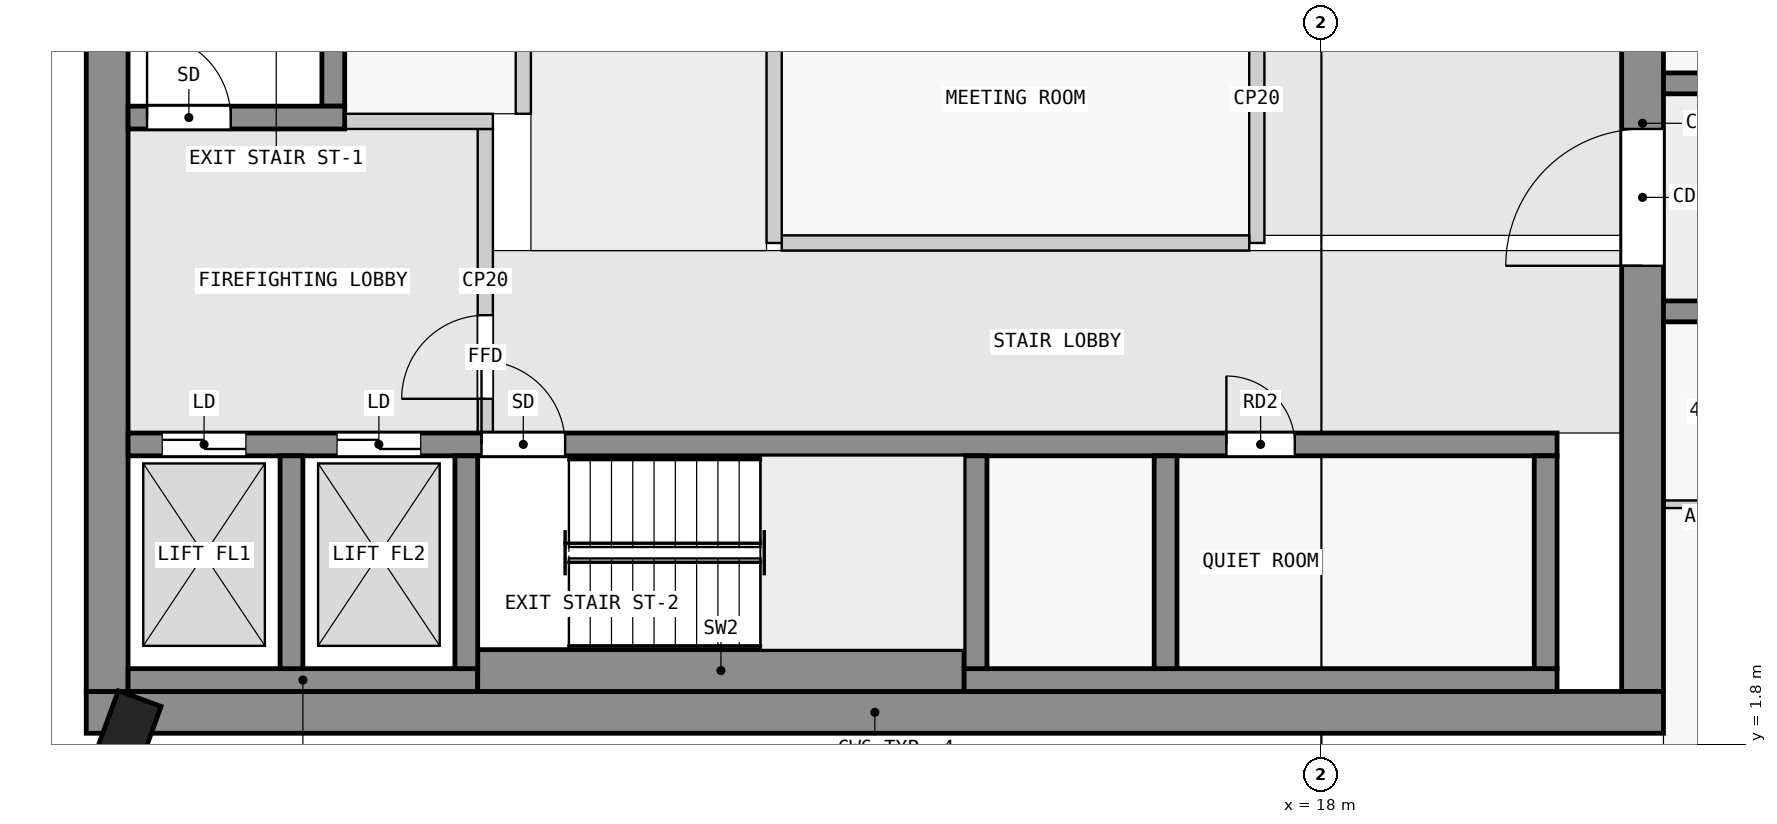
"""IFC4 building model, lengths in metres.
Left out: names, types, materials, properties, quantities, classifications, styles, units other than length and angle.
Written with IfcOpenShell. Run it as: python <this file> out.ifc"""

import sys

from ifc_helpers import new_model, si_unit, direction, frame, frame_2d, origin, origin_2d, place, context, subcontext, project, spatial, rectangle, extrude, element, fill, save


model = new_model("IFC4")
c1 = context("Model", 3, precision=1e-05, world=origin(), true_north=direction((0.0, 1.0)))
c2 = subcontext(c1, "Body", "Model", "MODEL_VIEW")
j1 = project(units=[si_unit("LENGTHUNIT", "METRE"), si_unit("PLANEANGLEUNIT", "RADIAN")], contexts=[c1])
p1 = place(None, origin())
s1 = spatial("IfcSite", under=j1, at=p1, CompositionType="ELEMENT")
p2 = place(p1, origin())
s2 = spatial("IfcBuilding", under=s1, at=p2, CompositionType="ELEMENT")
p3 = place(p2, frame((0.0, 0.0, 190.9)))
s3 = spatial("IfcBuildingStorey", under=s2, at=p3, CompositionType="ELEMENT", Elevation=190.9)
p4 = place(p3, frame((2.213, 1.748, 0.0), z_axis=(0.0, 0.0, 1.0), x_axis=(-0.939664280925, 0.342097996418, 0.0)))
e1 = element("IfcColumn", 1, at=p4, inside=s3, PredefinedType="COLUMN", context=c2, shape_type="SweptSolid", body=[
    extrude(rectangle(XDim=0.6, YDim=1.4, at=origin_2d()), origin(), (0.0, 0.0, 1.0), 3.5),
])
p5 = place(p3, frame((1.75, 2.225, 0.0), z_axis=(0.0, 0.0, 1.0), x_axis=(1.0, 0.0, 0.0)))
e2 = element("IfcWall", 2, at=p5, inside=s3, PredefinedType="SHEAR", context=c2, shape_type="SweptSolid", body=[
    extrude(rectangle(XDim=20.75, YDim=0.55, at=frame_2d((10.375, 0.0))), origin(), (0.0, 0.0, 1.0), 3.25),
])
p6 = place(p3, frame((2.025, 2.5, 0.0), z_axis=(0.0, 0.0, 1.0), x_axis=(0.0, 1.0, 0.0)))
e3 = element("IfcWall", 3, at=p6, inside=s3, PredefinedType="SHEAR", context=c2, shape_type="SweptSolid", body=[
    extrude(rectangle(XDim=14.95, YDim=0.55, at=frame_2d((7.475, 0.0))), origin(), (0.0, 0.0, 1.0), 3.25),
])
p7 = place(p3, frame((22.225, 2.5, 0.0), z_axis=(0.0, 0.0, 1.0), x_axis=(0.0, 1.0, 0.0)))
e4 = element("IfcWall", 4, at=p7, inside=s3, PredefinedType="SHEAR", context=c2, shape_type="SweptSolid", body=[
    extrude(rectangle(XDim=14.95, YDim=0.55, at=frame_2d((7.475, 0.0))), origin(), (0.0, 0.0, 1.0), 3.25),
])
p8 = place(p7, frame((5.6, 0.0, 0.0)))
e5 = element("IfcOpeningElement", 5, at=p8, cuts=e4, PredefinedType="OPENING", context=c2, shape_type="SweptSolid", body=[
    extrude(rectangle(XDim=1.8, YDim=2.1, at=frame_2d((0.9, 1.05))), frame((0.0, 0.285, 0.0), z_axis=(0.0, -1.0, 0.0), x_axis=(1.0, 0.0, 0.0)), (0.0, 0.0, 1.0), 0.57),
])
p9 = place(p3, frame((2.3, 2.65, 0.0), z_axis=(0.0, 0.0, 1.0), x_axis=(1.0, 0.0, 0.0)))
e6 = element("IfcWall", 6, at=p9, inside=s3, PredefinedType="SHEAR", context=c2, shape_type="SweptSolid", body=[
    extrude(rectangle(XDim=4.6, YDim=0.3, at=frame_2d((2.3, 0.0))), origin(), (0.0, 0.0, 1.0), 3.25),
])
p10 = place(p3, frame((6.9, 2.775, 0.0), z_axis=(0.0, 0.0, 1.0), x_axis=(1.0, 0.0, 0.0)))
e7 = element("IfcWall", 7, at=p10, inside=s3, PredefinedType="SHEAR", context=c2, shape_type="SweptSolid", body=[
    extrude(rectangle(XDim=6.4, YDim=0.55, at=frame_2d((3.2, 0.0))), origin(), (0.0, 0.0, 1.0), 3.25),
])
p11 = place(p3, frame((13.3, 2.65, 0.0), z_axis=(0.0, 0.0, 1.0), x_axis=(1.0, 0.0, 0.0)))
e8 = element("IfcWall", 8, at=p11, inside=s3, PredefinedType="SHEAR", context=c2, shape_type="SweptSolid", body=[
    extrude(rectangle(XDim=7.8, YDim=0.3, at=frame_2d((3.9, 0.0))), origin(), (0.0, 0.0, 1.0), 3.25),
])
for number, where, z_axis, x_axis in (
    (9, (4.45, 2.8, 0.0), (0.0, 0.0, 1.0), (0.0, 1.0, 0.0)),
    (10, (6.75, 2.8, 0.0), (0.0, 0.0, 1.0), (0.0, 1.0, 0.0)),
    (11, (13.45, 2.8, 0.0), (0.0, 0.0, 1.0), (0.0, 1.0, 0.0)),
    (12, (20.95, 2.8, 0.0), (0.0, 0.0, 1.0), (0.0, 1.0, 0.0)),
):
    element("IfcWall", number, at=place(p3, frame(where, z_axis=z_axis, x_axis=x_axis)), inside=s3, PredefinedType="SHEAR", context=c2, shape_type="SweptSolid", body=[
        extrude(rectangle(XDim=2.8, YDim=0.3, at=frame_2d((1.4, 0.0))), origin(), (0.0, 0.0, 1.0), 3.25),
    ])
p12 = place(p3, frame((2.3, 5.75, 0.0), z_axis=(0.0, 0.0, 1.0), x_axis=(1.0, 0.0, 0.0)))
e13 = element("IfcWall", 13, at=p12, inside=s3, PredefinedType="SHEAR", context=c2, shape_type="SweptSolid", body=[
    extrude(rectangle(XDim=18.8, YDim=0.3, at=frame_2d((9.4, 0.0))), origin(), (0.0, 0.0, 1.0), 3.25),
])
p13 = place(p12, frame((4.65, 0.0, 0.0)))
e14 = element("IfcOpeningElement", 14, at=p13, cuts=e13, PredefinedType="OPENING", context=c2, shape_type="SweptSolid", body=[
    extrude(rectangle(XDim=1.1, YDim=2.1, at=frame_2d((0.55, 1.05))), frame((0.0, 0.16, 0.0), z_axis=(0.0, -1.0, 0.0), x_axis=(1.0, 0.0, 0.0)), (0.0, 0.0, 1.0), 0.32),
])
p14 = place(p12, frame((0.45, 0.0, 0.0)))
e15 = element("IfcOpeningElement", 15, at=p14, cuts=e13, PredefinedType="OPENING", context=c2, shape_type="SweptSolid", body=[
    extrude(rectangle(XDim=1.1, YDim=2.1, at=frame_2d((0.55, 1.05))), frame((0.0, 0.16, 0.0), z_axis=(0.0, -1.0, 0.0), x_axis=(1.0, 0.0, 0.0)), (0.0, 0.0, 1.0), 0.32),
])
p15 = place(p12, frame((2.75, 0.0, 0.0)))
e16 = element("IfcOpeningElement", 16, at=p15, cuts=e13, PredefinedType="OPENING", context=c2, shape_type="SweptSolid", body=[
    extrude(rectangle(XDim=1.1, YDim=2.1, at=frame_2d((0.55, 1.05))), frame((0.0, 0.16, 0.0), z_axis=(0.0, -1.0, 0.0), x_axis=(1.0, 0.0, 0.0)), (0.0, 0.0, 1.0), 0.32),
])
p16 = place(p12, frame((14.45, 0.0, 0.0)))
e17 = element("IfcOpeningElement", 17, at=p16, cuts=e13, PredefinedType="OPENING", context=c2, shape_type="SweptSolid", body=[
    extrude(rectangle(XDim=0.9, YDim=2.1, at=frame_2d((0.45, 1.05))), frame((0.0, 0.16, 0.0), z_axis=(0.0, -1.0, 0.0), x_axis=(1.0, 0.0, 0.0)), (0.0, 0.0, 1.0), 0.32),
])
p17 = place(p3, frame((2.3, 10.05, 0.0), z_axis=(0.0, 0.0, 1.0), x_axis=(1.0, 0.0, 0.0)))
e18 = element("IfcWall", 18, at=p17, inside=s3, PredefinedType="SHEAR", context=c2, shape_type="SweptSolid", body=[
    extrude(rectangle(XDim=2.85, YDim=0.3, at=frame_2d((1.425, 0.0))), origin(), (0.0, 0.0, 1.0), 3.25),
])
p18 = place(p17, frame((0.25, 0.0, 0.0)))
e19 = element("IfcOpeningElement", 19, at=p18, cuts=e18, PredefinedType="OPENING", context=c2, shape_type="SweptSolid", body=[
    extrude(rectangle(XDim=1.1, YDim=2.1, at=frame_2d((0.55, 1.05))), frame((0.0, 0.16, 0.0), z_axis=(0.0, -1.0, 0.0), x_axis=(1.0, 0.0, 0.0)), (0.0, 0.0, 1.0), 0.32),
])
p19 = place(p3, frame((5.0, 10.2, 0.0), z_axis=(0.0, 0.0, 1.0), x_axis=(0.0, 1.0, 0.0)))
e20 = element("IfcWall", 20, at=p19, inside=s3, PredefinedType="SHEAR", context=c2, shape_type="SweptSolid", body=[
    extrude(rectangle(XDim=6.4, YDim=0.3, at=frame_2d((3.2, 0.0))), origin(), (0.0, 0.0, 1.0), 3.25),
])
p20 = place(p3, frame((22.5, 7.5, 0.0), z_axis=(0.0, 0.0, 1.0), x_axis=(1.0, 0.0, 0.0)))
e21 = element("IfcWall", 21, at=p20, inside=s3, PredefinedType="SHEAR", context=c2, shape_type="SweptSolid", body=[
    extrude(rectangle(XDim=22.5, YDim=0.275, at=frame_2d((11.25, 0.0))), origin(), (0.0, 0.0, 1.0), 3.25),
])
p21 = place(p20, frame((1.75, 0.0, 0.0)))
e22 = element("IfcOpeningElement", 22, at=p21, cuts=e21, PredefinedType="OPENING", context=c2, shape_type="SweptSolid", body=[
    extrude(rectangle(XDim=1.0, YDim=2.1, at=frame_2d((0.5, 1.05))), frame((0.0, 0.147, 0.0), z_axis=(0.0, -1.0, 0.0), x_axis=(1.0, 0.0, 0.0)), (0.0, 0.0, 1.0), 0.295),
])
p22 = place(p20, frame((5.85, 0.0, 0.0)))
e23 = element("IfcOpeningElement", 23, at=p22, cuts=e21, PredefinedType="OPENING", context=c2, shape_type="SweptSolid", body=[
    extrude(rectangle(XDim=1.8, YDim=2.1, at=frame_2d((0.9, 1.05))), frame((0.0, 0.147, 0.0), z_axis=(0.0, -1.0, 0.0), x_axis=(1.0, 0.0, 0.0)), (0.0, 0.0, 1.0), 0.295),
])
p23 = place(p20, frame((10.75, 0.0, 0.0)))
e24 = element("IfcOpeningElement", 24, at=p23, cuts=e21, PredefinedType="OPENING", context=c2, shape_type="SweptSolid", body=[
    extrude(rectangle(XDim=1.0, YDim=2.1, at=frame_2d((0.5, 1.05))), frame((0.0, 0.147, 0.0), z_axis=(0.0, -1.0, 0.0), x_axis=(1.0, 0.0, 0.0)), (0.0, 0.0, 1.0), 0.295),
])
p24 = place(p20, frame((16.85, 0.0, 0.0)))
e25 = element("IfcOpeningElement", 25, at=p24, cuts=e21, PredefinedType="OPENING", context=c2, shape_type="SweptSolid", body=[
    extrude(rectangle(XDim=1.0, YDim=2.1, at=frame_2d((0.5, 1.05))), frame((0.0, 0.147, 0.0), z_axis=(0.0, -1.0, 0.0), x_axis=(1.0, 0.0, 0.0)), (0.0, 0.0, 1.0), 0.295),
])
p25 = place(p3, frame((22.5, 10.5, 0.0), z_axis=(0.0, 0.0, 1.0), x_axis=(1.0, 0.0, 0.0)))
e26 = element("IfcWall", 26, at=p25, inside=s3, PredefinedType="SHEAR", context=c2, shape_type="SweptSolid", body=[
    extrude(rectangle(XDim=22.5, YDim=0.275, at=frame_2d((11.25, 0.0))), origin(), (0.0, 0.0, 1.0), 3.25),
])
p26 = place(p25, frame((1.75, 0.0, 0.0)))
e27 = element("IfcOpeningElement", 27, at=p26, cuts=e26, PredefinedType="OPENING", context=c2, shape_type="SweptSolid", body=[
    extrude(rectangle(XDim=1.0, YDim=2.1, at=frame_2d((0.5, 1.05))), frame((0.0, 0.147, 0.0), z_axis=(0.0, -1.0, 0.0), x_axis=(1.0, 0.0, 0.0)), (0.0, 0.0, 1.0), 0.295),
])
p27 = place(p25, frame((6.25, 0.0, 0.0)))
e28 = element("IfcOpeningElement", 28, at=p27, cuts=e26, PredefinedType="OPENING", context=c2, shape_type="SweptSolid", body=[
    extrude(rectangle(XDim=1.0, YDim=2.1, at=frame_2d((0.5, 1.05))), frame((0.0, 0.147, 0.0), z_axis=(0.0, -1.0, 0.0), x_axis=(1.0, 0.0, 0.0)), (0.0, 0.0, 1.0), 0.295),
])
p28 = place(p25, frame((10.75, 0.0, 0.0)))
e29 = element("IfcOpeningElement", 29, at=p28, cuts=e26, PredefinedType="OPENING", context=c2, shape_type="SweptSolid", body=[
    extrude(rectangle(XDim=1.0, YDim=2.1, at=frame_2d((0.5, 1.05))), frame((0.0, 0.147, 0.0), z_axis=(0.0, -1.0, 0.0), x_axis=(1.0, 0.0, 0.0)), (0.0, 0.0, 1.0), 0.295),
])
p29 = place(p25, frame((15.25, 0.0, 0.0)))
e30 = element("IfcOpeningElement", 30, at=p29, cuts=e26, PredefinedType="OPENING", context=c2, shape_type="SweptSolid", body=[
    extrude(rectangle(XDim=1.0, YDim=2.1, at=frame_2d((0.5, 1.05))), frame((0.0, 0.147, 0.0), z_axis=(0.0, -1.0, 0.0), x_axis=(1.0, 0.0, 0.0)), (0.0, 0.0, 1.0), 0.295),
])
p30 = place(p25, frame((18.75, 0.0, 0.0)))
e31 = element("IfcOpeningElement", 31, at=p30, cuts=e26, PredefinedType="OPENING", context=c2, shape_type="SweptSolid", body=[
    extrude(rectangle(XDim=0.9, YDim=2.1, at=frame_2d((0.45, 1.05))), frame((0.0, 0.147, 0.0), z_axis=(0.0, -1.0, 0.0), x_axis=(1.0, 0.0, 0.0)), (0.0, 0.0, 1.0), 0.295),
])
p31 = place(p25, frame((20.95, 0.0, 0.0)))
e32 = element("IfcOpeningElement", 32, at=p31, cuts=e26, PredefinedType="OPENING", context=c2, shape_type="SweptSolid", body=[
    extrude(rectangle(XDim=1.0, YDim=2.1, at=frame_2d((0.5, 1.05))), frame((0.0, 0.147, 0.0), z_axis=(0.0, -1.0, 0.0), x_axis=(1.0, 0.0, 0.0)), (0.0, 0.0, 1.0), 0.295),
])
p32 = place(p3, frame((7.0, 5.9, 0.0), z_axis=(0.0, 0.0, 1.0), x_axis=(0.0, 1.0, 0.0)))
e33 = element("IfcWall", 33, at=p32, inside=s3, PredefinedType="PARTITIONING", context=c2, shape_type="SweptSolid", body=[
    extrude(rectangle(XDim=4.0, YDim=0.2, at=frame_2d((2.0, 0.0))), origin(), (0.0, 0.0, 1.0), 3.25),
])
p33 = place(p32, frame((0.45, 0.0, 0.0)))
e34 = element("IfcOpeningElement", 34, at=p33, cuts=e33, PredefinedType="OPENING", context=c2, shape_type="SweptSolid", body=[
    extrude(rectangle(XDim=1.1, YDim=2.1, at=frame_2d((0.55, 1.05))), frame((0.0, 0.11, 0.0), z_axis=(0.0, -1.0, 0.0), x_axis=(1.0, 0.0, 0.0)), (0.0, 0.0, 1.0), 0.22),
])
p34 = place(p3, frame((5.15, 10.0, 0.0), z_axis=(0.0, 0.0, 1.0), x_axis=(1.0, 0.0, 0.0)))
e35 = element("IfcWall", 35, at=p34, inside=s3, PredefinedType="PARTITIONING", context=c2, shape_type="SweptSolid", body=[
    extrude(rectangle(XDim=1.95, YDim=0.2, at=frame_2d((0.975, 0.0))), origin(), (0.0, 0.0, 1.0), 3.25),
])
p35 = place(p3, frame((10.8, 8.4, 0.0), z_axis=(0.0, 0.0, 1.0), x_axis=(0.0, 1.0, 0.0)))
e36 = element("IfcWall", 36, at=p35, inside=s3, PredefinedType="PARTITIONING", context=c2, shape_type="SweptSolid", body=[
    extrude(rectangle(XDim=3.8, YDim=0.2, at=frame_2d((1.9, 0.0))), origin(), (0.0, 0.0, 1.0), 3.25),
])
p36 = place(p3, frame((10.9, 8.4, 0.0), z_axis=(0.0, 0.0, 1.0), x_axis=(1.0, 0.0, 0.0)))
e37 = element("IfcWall", 37, at=p36, inside=s3, PredefinedType="PARTITIONING", context=c2, shape_type="SweptSolid", body=[
    extrude(rectangle(XDim=6.15, YDim=0.2, at=frame_2d((3.075, 0.0))), origin(), (0.0, 0.0, 1.0), 3.25),
])
p37 = place(p3, frame((17.15, 8.4, 0.0), z_axis=(0.0, 0.0, 1.0), x_axis=(0.0, 1.0, 0.0)))
e38 = element("IfcWall", 38, at=p37, inside=s3, PredefinedType="PARTITIONING", context=c2, shape_type="SweptSolid", body=[
    extrude(rectangle(XDim=3.8, YDim=0.2, at=frame_2d((1.9, 0.0))), origin(), (0.0, 0.0, 1.0), 3.25),
])
p38 = place(p3, frame((7.5, 10.1, 0.0), z_axis=(0.0, 0.0, 1.0), x_axis=(0.0, 1.0, 0.0)))
e39 = element("IfcWall", 39, at=p38, inside=s3, PredefinedType="PARTITIONING", context=c2, shape_type="SweptSolid", body=[
    extrude(rectangle(XDim=7.35, YDim=0.2, at=frame_2d((3.675, 0.0))), origin(), (0.0, 0.0, 1.0), 3.25),
])
p39 = place(p38, frame((1.5, 0.0, 0.0)))
e40 = element("IfcOpeningElement", 40, at=p39, cuts=e39, PredefinedType="OPENING", context=c2, shape_type="SweptSolid", body=[
    extrude(rectangle(XDim=0.9, YDim=2.1, at=frame_2d((0.45, 1.05))), frame((0.0, 0.11, 0.0), z_axis=(0.0, -1.0, 0.0), x_axis=(1.0, 0.0, 0.0)), (0.0, 0.0, 1.0), 0.22),
])
p40 = place(p38, frame((5.175, 0.0, 0.0)))
e41 = element("IfcOpeningElement", 41, at=p40, cuts=e39, PredefinedType="OPENING", context=c2, shape_type="SweptSolid", body=[
    extrude(rectangle(XDim=0.9, YDim=2.1, at=frame_2d((0.45, 1.05))), frame((0.0, 0.11, 0.0), z_axis=(0.0, -1.0, 0.0), x_axis=(1.0, 0.0, 0.0)), (0.0, 0.0, 1.0), 0.22),
])
p41 = place(p3, frame((22.5, 4.962, 0.0), z_axis=(0.0, 0.0, 1.0), x_axis=(1.0, 0.0, 0.0)))
e42 = element("IfcWall", 42, at=p41, inside=s3, PredefinedType="PARTITIONING", context=c2, shape_type="SweptSolid", body=[
    extrude(rectangle(XDim=1.45, YDim=0.1, at=frame_2d((0.725, 0.0))), origin(), (0.0, 0.0, 1.0), 3.25),
])
p42 = place(p3, frame((15.95, 2.8, 0.0), z_axis=(0.0, 0.0, 1.0), x_axis=(0.0, 1.0, 0.0)))
e43 = element("IfcWall", 43, at=p42, inside=s3, PredefinedType="SHEAR", context=c2, shape_type="SweptSolid", body=[
    extrude(rectangle(XDim=2.8, YDim=0.3, at=frame_2d((1.4, 0.0))), origin(), (0.0, 0.0, 1.0), 3.25),
])
p43 = place(p33, origin())
e44 = element("IfcDoor", 44, at=p43, inside=s3, OperationType="SINGLE_SWING_LEFT", PredefinedType="DOOR", context=c2, shape_type="SweptSolid", body=[
    extrude(rectangle(XDim=1.1, YDim=2.1, at=frame_2d((0.55, 1.05))), frame((0.0, 0.025, 0.0), z_axis=(0.0, -1.0, 0.0), x_axis=(1.0, 0.0, 0.0)), (0.0, 0.0, 1.0), 0.05),
])
fill(e34, e44)
p44 = place(p18, origin())
e45 = element("IfcDoor", 45, at=p44, inside=s3, OperationType="SINGLE_SWING_RIGHT", PredefinedType="DOOR", context=c2, shape_type="SweptSolid", body=[
    extrude(rectangle(XDim=1.1, YDim=2.1, at=frame_2d((0.55, 1.05))), frame((0.0, 0.025, 0.0), z_axis=(0.0, -1.0, 0.0), x_axis=(1.0, 0.0, 0.0)), (0.0, 0.0, 1.0), 0.05),
])
fill(e19, e45)
p45 = place(p13, origin())
e46 = element("IfcDoor", 46, at=p45, inside=s3, OperationType="SINGLE_SWING_LEFT", PredefinedType="DOOR", context=c2, shape_type="SweptSolid", body=[
    extrude(rectangle(XDim=1.1, YDim=2.1, at=frame_2d((0.55, 1.05))), frame((0.0, 0.025, 0.0), z_axis=(0.0, -1.0, 0.0), x_axis=(1.0, 0.0, 0.0)), (0.0, 0.0, 1.0), 0.05),
])
fill(e14, e46)
p46 = place(p14, origin())
e47 = element("IfcDoor", 47, at=p46, inside=s3, OperationType="DOUBLE_DOOR_SLIDING", PredefinedType="DOOR", context=c2, shape_type="SweptSolid", body=[
    extrude(rectangle(XDim=1.1, YDim=2.1, at=frame_2d((0.55, 1.05))), frame((0.0, 0.025, 0.0), z_axis=(0.0, -1.0, 0.0), x_axis=(1.0, 0.0, 0.0)), (0.0, 0.0, 1.0), 0.05),
])
fill(e15, e47)
p47 = place(p15, origin())
e48 = element("IfcDoor", 48, at=p47, inside=s3, OperationType="DOUBLE_DOOR_SLIDING", PredefinedType="DOOR", context=c2, shape_type="SweptSolid", body=[
    extrude(rectangle(XDim=1.1, YDim=2.1, at=frame_2d((0.55, 1.05))), frame((0.0, 0.025, 0.0), z_axis=(0.0, -1.0, 0.0), x_axis=(1.0, 0.0, 0.0)), (0.0, 0.0, 1.0), 0.05),
])
fill(e16, e48)
p48 = place(p8, origin())
e49 = element("IfcDoor", 49, at=p48, inside=s3, OperationType="DOUBLE_DOOR_SINGLE_SWING", PredefinedType="DOOR", context=c2, shape_type="SweptSolid", body=[
    extrude(rectangle(XDim=1.8, YDim=2.1, at=frame_2d((0.9, 1.05))), frame((0.0, 0.025, 0.0), z_axis=(0.0, -1.0, 0.0), x_axis=(1.0, 0.0, 0.0)), (0.0, 0.0, 1.0), 0.05),
])
fill(e5, e49)
p49 = place(p16, origin())
e50 = element("IfcDoor", 50, at=p49, inside=s3, OperationType="SINGLE_SWING_LEFT", PredefinedType="DOOR", context=c2, shape_type="SweptSolid", body=[
    extrude(rectangle(XDim=0.9, YDim=2.1, at=frame_2d((0.45, 1.05))), frame((0.0, 0.025, 0.0), z_axis=(0.0, -1.0, 0.0), x_axis=(1.0, 0.0, 0.0)), (0.0, 0.0, 1.0), 0.05),
])
fill(e17, e50)
save(model, sys.argv[1])
